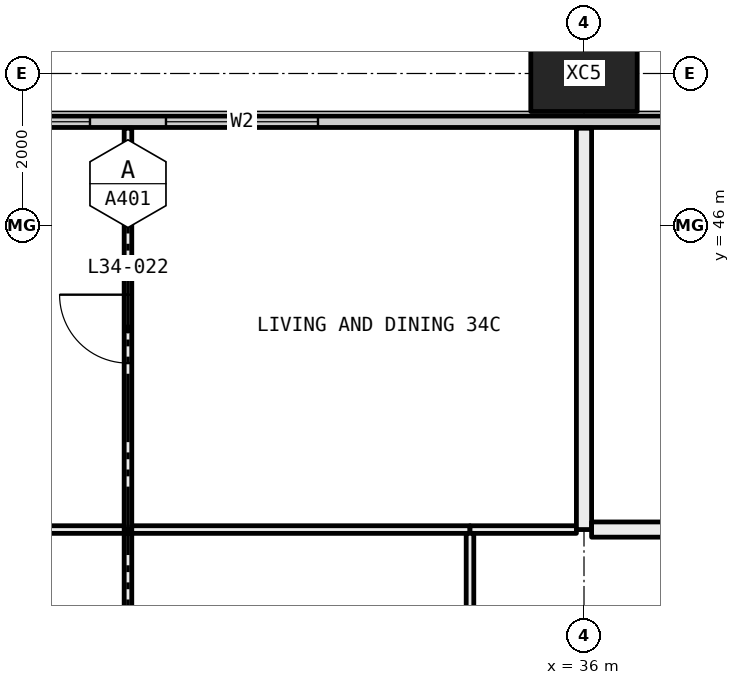
"""IFC4 building model, lengths in metres.
Left out: names, types, materials, properties, quantities, classifications, styles, units other than length and angle.
Written with IfcOpenShell. Run it as: python <this file> out.ifc"""

import sys

from ifc_helpers import new_model, si_unit, direction, frame, frame_2d, origin, origin_2d, place, context, subcontext, project, spatial, rectangle, hollow_rectangle, extrude, element, fill, save


model = new_model("IFC4")
c1 = context("Model", 3, precision=1e-05, world=origin(), true_north=direction((0.0, 1.0)))
c2 = subcontext(c1, "Body", "Model", "MODEL_VIEW")
j1 = project(units=[si_unit("LENGTHUNIT", "METRE"), si_unit("PLANEANGLEUNIT", "RADIAN")], contexts=[c1])
p1 = place(None, origin())
s1 = spatial("IfcSite", under=j1, at=p1, CompositionType="ELEMENT")
p2 = place(p1, origin())
s2 = spatial("IfcBuilding", under=s1, at=p2, CompositionType="ELEMENT")
p3 = place(p2, frame((0.0, 0.0, 131.1)))
s3 = spatial("IfcBuildingStorey", under=s2, at=p3, CompositionType="ELEMENT", Elevation=131.1)
p4 = place(p3, frame((36.0, 48.0, -0.4), z_axis=(0.0, 0.0, 1.0), x_axis=(1.0, 0.0, 0.0)))
e1 = element("IfcColumn", 1, at=p4, inside=s3, PredefinedType="COLUMN", context=c2, shape_type="SweptSolid", body=[
    extrude(hollow_rectangle(XDim=1.4, YDim=1.0, WallThickness=0.055, at=origin_2d()), origin(), (0.0, 0.0, 1.0), 3.45),
])
p5 = place(p3, frame((6.56, 47.365, 0.0), z_axis=(0.0, 0.0, 1.0), x_axis=(1.0, 0.0, 0.0)))
e2 = element("IfcWall", 2, at=p5, inside=s3, PredefinedType="ELEMENTEDWALL", context=c2, shape_type="SweptSolid", body=[
    extrude(rectangle(XDim=58.88, YDim=0.15, at=frame_2d((29.44, 0.0))), origin(), (0.0, 0.0, 1.0), 3.05),
])
p6 = place(p5, frame((0.44, 0.0, 0.45)))
e3 = element("IfcOpeningElement", 3, at=p6, cuts=e2, PredefinedType="OPENING", context=c2, shape_type="SweptSolid", body=[
    extrude(rectangle(XDim=4.5, YDim=2.55, at=frame_2d((2.25, 1.275))), frame((0.0, 0.085, 0.0), z_axis=(0.0, -1.0, 0.0), x_axis=(1.0, 0.0, 0.0)), (0.0, 0.0, 1.0), 0.17),
])
p7 = place(p5, frame((7.69, 0.0, 0.45)))
e4 = element("IfcOpeningElement", 4, at=p7, cuts=e2, PredefinedType="OPENING", context=c2, shape_type="SweptSolid", body=[
    extrude(rectangle(XDim=3.25, YDim=2.55, at=frame_2d((1.625, 1.275))), frame((0.0, 0.085, 0.0), z_axis=(0.0, -1.0, 0.0), x_axis=(1.0, 0.0, 0.0)), (0.0, 0.0, 1.0), 0.17),
])
p8 = place(p5, frame((11.94, 0.0, 0.45)))
e5 = element("IfcOpeningElement", 5, at=p8, cuts=e2, PredefinedType="OPENING", context=c2, shape_type="SweptSolid", body=[
    extrude(rectangle(XDim=3.25, YDim=2.55, at=frame_2d((1.625, 1.275))), frame((0.0, 0.085, 0.0), z_axis=(0.0, -1.0, 0.0), x_axis=(1.0, 0.0, 0.0)), (0.0, 0.0, 1.0), 0.17),
])
p9 = place(p5, frame((19.69, 0.0, 0.45)))
e6 = element("IfcOpeningElement", 6, at=p9, cuts=e2, PredefinedType="OPENING", context=c2, shape_type="SweptSolid", body=[
    extrude(rectangle(XDim=3.25, YDim=2.55, at=frame_2d((1.625, 1.275))), frame((0.0, 0.085, 0.0), z_axis=(0.0, -1.0, 0.0), x_axis=(1.0, 0.0, 0.0)), (0.0, 0.0, 1.0), 0.17),
])
p10 = place(p5, frame((23.94, 0.0, 0.45)))
e7 = element("IfcOpeningElement", 7, at=p10, cuts=e2, PredefinedType="OPENING", context=c2, shape_type="SweptSolid", body=[
    extrude(rectangle(XDim=2.0, YDim=2.55, at=frame_2d((1.0, 1.275))), frame((0.0, 0.085, 0.0), z_axis=(0.0, -1.0, 0.0), x_axis=(1.0, 0.0, 0.0)), (0.0, 0.0, 1.0), 0.17),
])
p11 = place(p5, frame((31.69, 0.0, 0.45)))
e8 = element("IfcOpeningElement", 8, at=p11, cuts=e2, PredefinedType="OPENING", context=c2, shape_type="SweptSolid", body=[
    extrude(rectangle(XDim=3.25, YDim=2.55, at=frame_2d((1.625, 1.275))), frame((0.0, 0.085, 0.0), z_axis=(0.0, -1.0, 0.0), x_axis=(1.0, 0.0, 0.0)), (0.0, 0.0, 1.0), 0.17),
])
p12 = place(p5, frame((35.94, 0.0, 0.45)))
e9 = element("IfcOpeningElement", 9, at=p12, cuts=e2, PredefinedType="OPENING", context=c2, shape_type="SweptSolid", body=[
    extrude(rectangle(XDim=3.25, YDim=2.55, at=frame_2d((1.625, 1.275))), frame((0.0, 0.085, 0.0), z_axis=(0.0, -1.0, 0.0), x_axis=(1.0, 0.0, 0.0)), (0.0, 0.0, 1.0), 0.17),
])
p13 = place(p5, frame((43.69, 0.0, 0.45)))
e10 = element("IfcOpeningElement", 10, at=p13, cuts=e2, PredefinedType="OPENING", context=c2, shape_type="SweptSolid", body=[
    extrude(rectangle(XDim=3.25, YDim=2.55, at=frame_2d((1.625, 1.275))), frame((0.0, 0.085, 0.0), z_axis=(0.0, -1.0, 0.0), x_axis=(1.0, 0.0, 0.0)), (0.0, 0.0, 1.0), 0.17),
])
p14 = place(p5, frame((47.94, 0.0, 0.45)))
e11 = element("IfcOpeningElement", 11, at=p14, cuts=e2, PredefinedType="OPENING", context=c2, shape_type="SweptSolid", body=[
    extrude(rectangle(XDim=2.0, YDim=2.55, at=frame_2d((1.0, 1.275))), frame((0.0, 0.085, 0.0), z_axis=(0.0, -1.0, 0.0), x_axis=(1.0, 0.0, 0.0)), (0.0, 0.0, 1.0), 0.17),
])
p15 = place(p5, frame((53.94, 0.0, 0.45)))
e12 = element("IfcOpeningElement", 12, at=p15, cuts=e2, PredefinedType="OPENING", context=c2, shape_type="SweptSolid", body=[
    extrude(rectangle(XDim=4.5, YDim=2.55, at=frame_2d((2.25, 1.275))), frame((0.0, 0.085, 0.0), z_axis=(0.0, -1.0, 0.0), x_axis=(1.0, 0.0, 0.0)), (0.0, 0.0, 1.0), 0.17),
])
p16 = place(p3, frame((30.0, 42.0, 0.0), z_axis=(0.0, 0.0, 1.0), x_axis=(0.0, 1.0, 0.0)))
e13 = element("IfcWall", 13, at=p16, inside=s3, PredefinedType="PARTITIONING", context=c2, shape_type="SweptSolid", body=[
    extrude(rectangle(XDim=5.28, YDim=0.1, at=frame_2d((2.64, 0.0))), origin(), (0.0, 0.0, 1.0), 3.05),
])
p17 = place(p16, frame((2.19, 0.0, 0.0)))
e14 = element("IfcOpeningElement", 14, at=p17, cuts=e13, PredefinedType="OPENING", context=c2, shape_type="SweptSolid", body=[
    extrude(rectangle(XDim=0.9, YDim=2.1, at=frame_2d((0.45, 1.05))), frame((0.0, 0.06, 0.0), z_axis=(0.0, -1.0, 0.0), x_axis=(1.0, 0.0, 0.0)), (0.0, 0.0, 1.0), 0.12),
])
p18 = place(p3, frame((26.0, 42.0, 0.0), z_axis=(0.0, 0.0, 1.0), x_axis=(1.0, 0.0, 0.0)))
e15 = element("IfcWall", 15, at=p18, inside=s3, PredefinedType="PARTITIONING", context=c2, shape_type="SweptSolid", body=[
    extrude(rectangle(XDim=3.95, YDim=0.1, at=frame_2d((1.975, 0.0))), origin(), (0.0, 0.0, 1.0), 3.05),
])
p19 = place(p18, frame((1.525, 0.0, 0.0)))
e16 = element("IfcOpeningElement", 16, at=p19, cuts=e15, PredefinedType="OPENING", context=c2, shape_type="SweptSolid", body=[
    extrude(rectangle(XDim=0.9, YDim=2.1, at=frame_2d((0.45, 1.05))), frame((0.0, 0.06, 0.0), z_axis=(0.0, -1.0, 0.0), x_axis=(1.0, 0.0, 0.0)), (0.0, 0.0, 1.0), 0.12),
])
p20 = place(p3, frame((30.05, 42.0, 0.0), z_axis=(0.0, 0.0, 1.0), x_axis=(1.0, 0.0, 0.0)))
e17 = element("IfcWall", 17, at=p20, inside=s3, PredefinedType="PARTITIONING", context=c2, shape_type="SweptSolid", body=[
    extrude(rectangle(XDim=4.45, YDim=0.1, at=frame_2d((2.225, 0.0))), origin(), (0.0, 0.0, 1.0), 3.05),
])
p21 = place(p3, frame((34.5, 42.0, 0.0), z_axis=(0.0, 0.0, 1.0), x_axis=(1.0, 0.0, 0.0)))
e18 = element("IfcWall", 18, at=p21, inside=s3, PredefinedType="PARTITIONING", context=c2, shape_type="SweptSolid", body=[
    extrude(rectangle(XDim=1.4, YDim=0.1, at=frame_2d((0.7, 0.0))), origin(), (0.0, 0.0, 1.0), 3.05),
])
p22 = place(p3, frame((36.0, 42.0, 0.0), z_axis=(0.0, 0.0, 1.0), x_axis=(0.0, 1.0, 0.0)))
e19 = element("IfcWall", 19, at=p22, inside=s3, PredefinedType="PARTITIONING", context=c2, shape_type="SweptSolid", body=[
    extrude(rectangle(XDim=5.28, YDim=0.2, at=frame_2d((2.64, 0.0))), origin(), (0.0, 0.0, 1.0), 2.45),
])
p23 = place(p3, frame((30.0, 36.1, 0.0), z_axis=(0.0, 0.0, 1.0), x_axis=(0.0, 1.0, 0.0)))
e20 = element("IfcWall", 20, at=p23, inside=s3, PredefinedType="PARTITIONING", context=c2, shape_type="SweptSolid", body=[
    extrude(rectangle(XDim=5.85, YDim=0.1, at=frame_2d((2.925, 0.0))), origin(), (0.0, 0.0, 1.0), 3.05),
])
p24 = place(p23, frame((2.475, 0.0, 0.0)))
e21 = element("IfcOpeningElement", 21, at=p24, cuts=e20, PredefinedType="OPENING", context=c2, shape_type="SweptSolid", body=[
    extrude(rectangle(XDim=0.9, YDim=2.1, at=frame_2d((0.45, 1.05))), frame((0.0, 0.06, 0.0), z_axis=(0.0, -1.0, 0.0), x_axis=(1.0, 0.0, 0.0)), (0.0, 0.0, 1.0), 0.12),
])
p25 = place(p3, frame((34.5, 36.1, 0.0), z_axis=(0.0, 0.0, 1.0), x_axis=(0.0, 1.0, 0.0)))
e22 = element("IfcWall", 22, at=p25, inside=s3, PredefinedType="PARTITIONING", context=c2, shape_type="SweptSolid", body=[
    extrude(rectangle(XDim=5.85, YDim=0.1, at=frame_2d((2.925, 0.0))), origin(), (0.0, 0.0, 1.0), 3.05),
])
p26 = place(p25, frame((2.475, 0.0, 0.0)))
e23 = element("IfcOpeningElement", 23, at=p26, cuts=e22, PredefinedType="OPENING", context=c2, shape_type="SweptSolid", body=[
    extrude(rectangle(XDim=0.9, YDim=2.1, at=frame_2d((0.45, 1.05))), frame((0.0, 0.06, 0.0), z_axis=(0.0, -1.0, 0.0), x_axis=(1.0, 0.0, 0.0)), (0.0, 0.0, 1.0), 0.12),
])
p27 = place(p3, frame((38.4, 42.0, 0.0), z_axis=(0.0, 0.0, 1.0), x_axis=(-1.0, 0.0, 0.0)))
e24 = element("IfcWall", 24, at=p27, inside=s3, PredefinedType="PARTITIONING", context=c2, shape_type="SweptSolid", body=[
    extrude(rectangle(XDim=2.3, YDim=0.2, at=frame_2d((1.15, 0.0))), origin(), (0.0, 0.0, 1.0), 3.05),
])
p28 = place(p9, origin())
e25 = element("IfcWindow", 25, at=p28, inside=s3, PartitioningType="SINGLE_PANEL", PredefinedType="WINDOW", context=c2, shape_type="SweptSolid", body=[
    extrude(rectangle(XDim=3.25, YDim=2.55, at=frame_2d((1.625, 1.275))), frame((0.0, 0.03, 0.0), z_axis=(0.0, -1.0, 0.0), x_axis=(1.0, 0.0, 0.0)), (0.0, 0.0, 1.0), 0.06),
])
fill(e6, e25)
p29 = place(p10, origin())
e26 = element("IfcWindow", 26, at=p29, inside=s3, PartitioningType="SINGLE_PANEL", PredefinedType="WINDOW", context=c2, shape_type="SweptSolid", body=[
    extrude(rectangle(XDim=2.0, YDim=2.55, at=frame_2d((1.0, 1.275))), frame((0.0, 0.03, 0.0), z_axis=(0.0, -1.0, 0.0), x_axis=(1.0, 0.0, 0.0)), (0.0, 0.0, 1.0), 0.06),
])
fill(e7, e26)
p30 = place(p17, origin())
e27 = element("IfcDoor", 27, at=p30, inside=s3, OperationType="SINGLE_SWING_LEFT", PredefinedType="DOOR", context=c2, shape_type="SweptSolid", body=[
    extrude(rectangle(XDim=0.9, YDim=2.1, at=frame_2d((0.45, 1.05))), frame((0.0, 0.025, 0.0), z_axis=(0.0, -1.0, 0.0), x_axis=(1.0, 0.0, 0.0)), (0.0, 0.0, 1.0), 0.05),
])
fill(e14, e27)
save(model, sys.argv[1])
